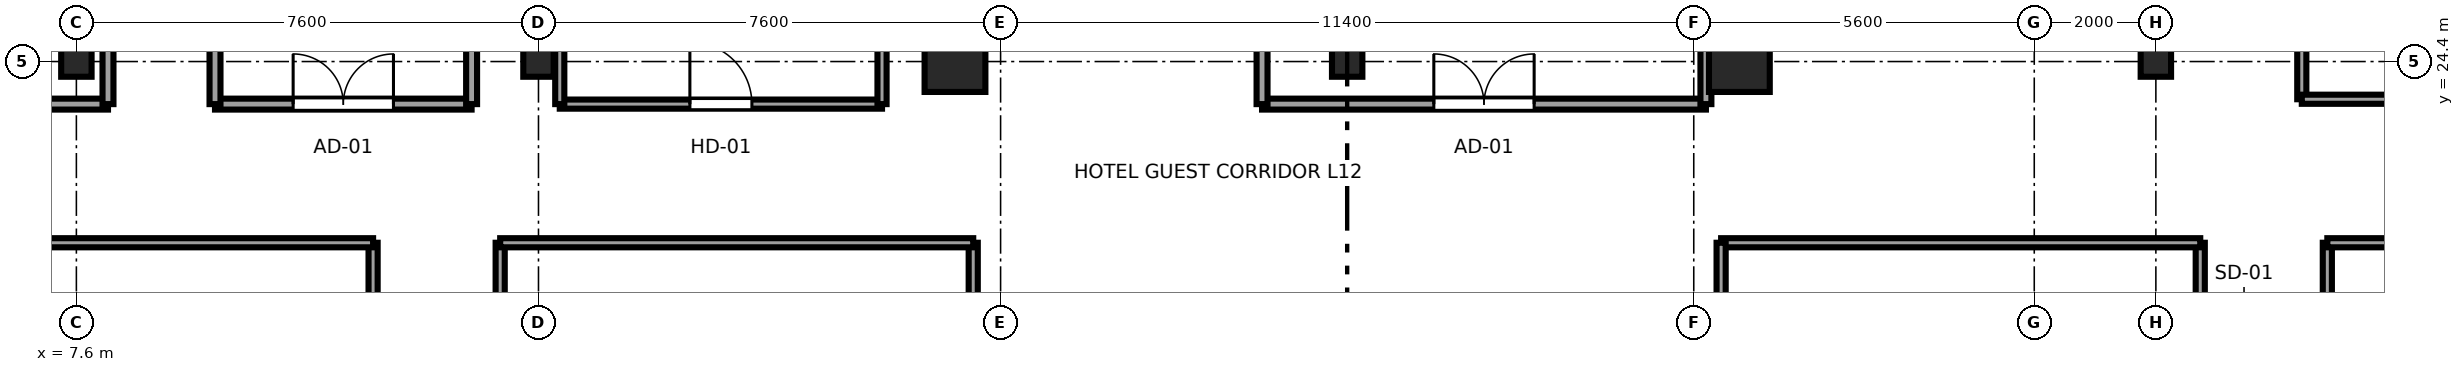
"""IFC4 building model, lengths in metres.
Left out: names, types, materials, properties, quantities, classifications, styles, units other than length and angle.
Written with IfcOpenShell. Run it as: python <this file> out.ifc"""

import sys

from ifc_helpers import new_model, si_unit, direction, frame, frame_2d, origin, origin_2d, place, context, subcontext, project, spatial, rectangle, i_section, extrude, source, transform, mapped, element, fill, save


model = new_model("IFC4")
c1 = context("Model", 3, precision=1e-05, world=origin(), true_north=direction((0.0, 1.0)))
c2 = subcontext(c1, "Body", "Model", "MODEL_VIEW")
j1 = project(units=[si_unit("LENGTHUNIT", "METRE"), si_unit("PLANEANGLEUNIT", "RADIAN")], contexts=[c1])
p1 = place(None, origin())
s1 = spatial("IfcSite", under=j1, at=p1, CompositionType="ELEMENT")
p2 = place(p1, origin())
s2 = spatial("IfcBuilding", under=s1, at=p2, CompositionType="ELEMENT")
p3 = place(p2, frame((0.0, 0.0, 53.3)))
s3 = spatial("IfcBuildingStorey", under=s2, at=p3, CompositionType="ELEMENT", Elevation=53.3)
m1 = source(origin(), c2, "Body", "SweptSolid", [
    extrude(i_section(OverallWidth=0.5, OverallDepth=0.5, WebThickness=0.028, FlangeThickness=0.045, at=origin_2d()), origin(), (0.0, 0.0, 1.0), 3.55),
])
for number, where, z_axis, x_axis in (
    (1, (7.6, 24.4, 0.0), (0.0, 0.0, 1.0), (1.0, 0.0, 0.0)),
    (2, (15.2, 24.4, 0.0), (0.0, 0.0, 1.0), (1.0, 0.0, 0.0)),
):
    element("IfcColumn", number, at=place(p3, frame(where, z_axis=z_axis, x_axis=x_axis)), inside=s3, PredefinedType="COLUMN", context=c2, shape_type="MappedRepresentation", body=[
        mapped(m1, transform((0.0, 0.0, 0.0), x_axis=(1.0, 0.0, 0.0), y_axis=(0.0, 1.0, 0.0), z_axis=(0.0, 0.0, 1.0), scale=1.0)),
    ])
m2 = source(origin(), c2, "Body", "SweptSolid", [
    extrude(rectangle(XDim=1.0, YDim=1.0, at=origin_2d()), origin(), (0.0, 0.0, 1.0), 3.55),
])
for number, where, z_axis, x_axis in (
    (3, (22.05, 24.4, 0.0), (0.0, 0.0, 1.0), (1.0, 0.0, 0.0)),
    (4, (34.95, 24.4, 0.0), (0.0, 0.0, 1.0), (1.0, 0.0, 0.0)),
):
    element("IfcColumn", number, at=place(p3, frame(where, z_axis=z_axis, x_axis=x_axis)), inside=s3, PredefinedType="COLUMN", context=c2, shape_type="MappedRepresentation", body=[
        mapped(m2, transform((0.0, 0.0, 0.0), x_axis=(1.0, 0.0, 0.0), y_axis=(0.0, 1.0, 0.0), z_axis=(0.0, 0.0, 1.0), scale=1.0)),
    ])
for number, where, z_axis, x_axis in (
    (5, (41.8, 24.4, 0.0), (0.0, 0.0, 1.0), (1.0, 0.0, 0.0)),
    (6, (28.5, 24.4, 0.0), (0.0, 0.0, 1.0), (1.0, 0.0, 0.0)),
):
    element("IfcColumn", number, at=place(p3, frame(where, z_axis=z_axis, x_axis=x_axis)), inside=s3, PredefinedType="COLUMN", context=c2, shape_type="MappedRepresentation", body=[
        mapped(m1, transform((0.0, 0.0, 0.0), x_axis=(1.0, 0.0, 0.0), y_axis=(0.0, 1.0, 0.0), z_axis=(0.0, 0.0, 1.0), scale=1.0)),
    ])
p4 = place(p3, frame((12.48, 17.01, 0.0), z_axis=(0.0, 0.0, 1.0), x_axis=(0.0, 1.0, 0.0)))
e7 = element("IfcWall", 7, at=p4, inside=s3, PredefinedType="PARTITIONING", context=c2, shape_type="SweptSolid", body=[
    extrude(rectangle(XDim=4.41, YDim=0.15, at=frame_2d((2.205, 0.0))), origin(), (0.0, 0.0, 1.0), 3.37),
])
p5 = place(p4, frame((1.695, 0.0, 0.0)))
e8 = element("IfcOpeningElement", 8, at=p5, cuts=e7, PredefinedType="OPENING", context=c2, shape_type="SweptSolid", body=[
    extrude(rectangle(XDim=0.98, YDim=2.12, at=frame_2d((0.49, 1.06))), frame((0.0, 0.085, 0.0), z_axis=(0.0, -1.0, 0.0), x_axis=(1.0, 0.0, 0.0)), (0.0, 0.0, 1.0), 0.17),
])
p6 = place(p3, frame((0.3, 21.42, 0.0), z_axis=(0.0, 0.0, 1.0), x_axis=(1.0, 0.0, 0.0)))
e9 = element("IfcWall", 9, at=p6, inside=s3, PredefinedType="PARTITIONING", context=c2, shape_type="SweptSolid", body=[
    extrude(rectangle(XDim=12.18, YDim=0.15, at=frame_2d((6.09, 0.0))), origin(), (0.0, 0.0, 1.0), 3.37),
])
p7 = place(p3, frame((14.57, 13.41, 0.0), z_axis=(0.0, 0.0, 1.0), x_axis=(0.0, 1.0, 0.0)))
e10 = element("IfcWall", 10, at=p7, inside=s3, PredefinedType="PARTITIONING", context=c2, shape_type="SweptSolid", body=[
    extrude(rectangle(XDim=8.01, YDim=0.15, at=frame_2d((4.005, 0.0))), origin(), (0.0, 0.0, 1.0), 3.37),
])
p8 = place(p7, frame((3.795, 0.0, 0.0)))
e11 = element("IfcOpeningElement", 11, at=p8, cuts=e10, PredefinedType="OPENING", context=c2, shape_type="SweptSolid", body=[
    extrude(rectangle(XDim=0.98, YDim=2.12, at=frame_2d((0.49, 1.06))), frame((0.0, 0.085, 0.0), z_axis=(0.0, -1.0, 0.0), x_axis=(1.0, 0.0, 0.0)), (0.0, 0.0, 1.0), 0.17),
])
p9 = place(p3, frame((22.35, 11.08, 0.0), z_axis=(0.0, 0.0, 1.0), x_axis=(0.0, 1.0, 0.0)))
e12 = element("IfcWall", 12, at=p9, inside=s3, PredefinedType="PARTITIONING", context=c2, shape_type="SweptSolid", body=[
    extrude(rectangle(XDim=10.34, YDim=0.15, at=frame_2d((5.17, 0.0))), origin(), (0.0, 0.0, 1.0), 3.37),
])
p10 = place(p3, frame((14.57, 21.42, 0.0), z_axis=(0.0, 0.0, 1.0), x_axis=(1.0, 0.0, 0.0)))
e13 = element("IfcWall", 13, at=p10, inside=s3, PredefinedType="PARTITIONING", context=c2, shape_type="SweptSolid", body=[
    extrude(rectangle(XDim=7.78, YDim=0.15, at=frame_2d((3.89, 0.0))), origin(), (0.0, 0.0, 1.0), 3.37),
])
p11 = place(p3, frame((42.53, 18.437, 0.0), z_axis=(0.0, 0.0, 1.0), x_axis=(0.0, 1.0, 0.0)))
e14 = element("IfcWall", 14, at=p11, inside=s3, PredefinedType="PARTITIONING", context=c2, shape_type="SweptSolid", body=[
    extrude(rectangle(XDim=2.983, YDim=0.15, at=frame_2d((1.491, 0.0))), origin(), (0.0, 0.0, 1.0), 3.37),
])
p12 = place(p11, frame((0.981, 0.0, 0.0)))
e15 = element("IfcOpeningElement", 15, at=p12, cuts=e14, PredefinedType="OPENING", context=c2, shape_type="SweptSolid", body=[
    extrude(rectangle(XDim=0.98, YDim=2.12, at=frame_2d((0.49, 1.06))), frame((0.0, 0.085, 0.0), z_axis=(0.0, -1.0, 0.0), x_axis=(1.0, 0.0, 0.0)), (0.0, 0.0, 1.0), 0.17),
])
p13 = place(p3, frame((34.65, 21.42, 0.0), z_axis=(0.0, 0.0, 1.0), x_axis=(1.0, 0.0, 0.0)))
e16 = element("IfcWall", 16, at=p13, inside=s3, PredefinedType="PARTITIONING", context=c2, shape_type="SweptSolid", body=[
    extrude(rectangle(XDim=7.88, YDim=0.15, at=frame_2d((3.94, 0.0))), origin(), (0.0, 0.0, 1.0), 3.37),
])
p14 = place(p3, frame((34.65, 16.48, 0.0), z_axis=(0.0, 0.0, 1.0), x_axis=(0.0, 1.0, 0.0)))
e17 = element("IfcWall", 17, at=p14, inside=s3, PredefinedType="PARTITIONING", context=c2, shape_type="SweptSolid", body=[
    extrude(rectangle(XDim=4.94, YDim=0.15, at=frame_2d((2.47, 0.0))), origin(), (0.0, 0.0, 1.0), 3.37),
])
p15 = place(p3, frame((44.62, 18.313, 0.0), z_axis=(0.0, 0.0, 1.0), x_axis=(0.0, 1.0, 0.0)))
e18 = element("IfcWall", 18, at=p15, inside=s3, PredefinedType="PARTITIONING", context=c2, shape_type="SweptSolid", body=[
    extrude(rectangle(XDim=3.107, YDim=0.15, at=frame_2d((1.553, 0.0))), origin(), (0.0, 0.0, 1.0), 3.37),
])
p16 = place(p15, frame((1.043, 0.0, 0.0)))
e19 = element("IfcOpeningElement", 19, at=p16, cuts=e18, PredefinedType="OPENING", context=c2, shape_type="SweptSolid", body=[
    extrude(rectangle(XDim=0.98, YDim=2.12, at=frame_2d((0.49, 1.06))), frame((0.0, 0.085, 0.0), z_axis=(0.0, -1.0, 0.0), x_axis=(1.0, 0.0, 0.0)), (0.0, 0.0, 1.0), 0.17),
])
p17 = place(p3, frame((44.62, 21.42, 0.0), z_axis=(0.0, 0.0, 1.0), x_axis=(1.0, 0.0, 0.0)))
e20 = element("IfcWall", 20, at=p17, inside=s3, PredefinedType="PARTITIONING", context=c2, shape_type="SweptSolid", body=[
    extrude(rectangle(XDim=11.975, YDim=0.15, at=frame_2d((5.987, 0.0))), origin(), (0.0, 0.0, 1.0), 3.37),
])
p18 = place(p3, frame((0.3, 23.7, 0.0), z_axis=(0.0, 0.0, 1.0), x_axis=(1.0, 0.0, 0.0)))
e21 = element("IfcWall", 21, at=p18, inside=s3, PredefinedType="PARTITIONING", context=c2, shape_type="SweptSolid", body=[
    extrude(rectangle(XDim=7.82, YDim=0.18, at=frame_2d((3.91, 0.0))), origin(), (0.0, 0.0, 1.0), 3.37),
])
p19 = place(p18, frame((3.085, 0.0, 0.0)))
e22 = element("IfcOpeningElement", 22, at=p19, cuts=e21, PredefinedType="OPENING", context=c2, shape_type="SweptSolid", body=[
    extrude(rectangle(XDim=1.65, YDim=2.15, at=frame_2d((0.825, 1.075))), frame((0.0, 0.1, 0.0), z_axis=(0.0, -1.0, 0.0), x_axis=(1.0, 0.0, 0.0)), (0.0, 0.0, 1.0), 0.2),
])
p20 = place(p3, frame((8.12, 23.7, 0.0), z_axis=(0.0, 0.0, 1.0), x_axis=(0.0, 1.0, 0.0)))
e23 = element("IfcWall", 23, at=p20, inside=s3, PredefinedType="PARTITIONING", context=c2, shape_type="SweptSolid", body=[
    extrude(rectangle(XDim=3.6, YDim=0.18, at=frame_2d((1.8, 0.0))), origin(), (0.0, 0.0, 1.0), 3.37),
])
p21 = place(p3, frame((44.2, 23.78, 0.0), z_axis=(0.0, 0.0, 1.0), x_axis=(0.0, 1.0, 0.0)))
e24 = element("IfcWall", 24, at=p21, inside=s3, PredefinedType="PARTITIONING", context=c2, shape_type="SweptSolid", body=[
    extrude(rectangle(XDim=5.69, YDim=0.15, at=frame_2d((2.845, 0.0))), origin(), (0.0, 0.0, 1.0), 3.37),
])
p22 = place(p21, frame((2.355, 0.0, 0.0)))
e25 = element("IfcOpeningElement", 25, at=p22, cuts=e24, PredefinedType="OPENING", context=c2, shape_type="SweptSolid", body=[
    extrude(rectangle(XDim=0.98, YDim=2.12, at=frame_2d((0.49, 1.06))), frame((0.0, 0.085, 0.0), z_axis=(0.0, -1.0, 0.0), x_axis=(1.0, 0.0, 0.0)), (0.0, 0.0, 1.0), 0.17),
])
p23 = place(p3, frame((44.2, 23.78, 0.0), z_axis=(0.0, 0.0, 1.0), x_axis=(1.0, 0.0, 0.0)))
e26 = element("IfcWall", 26, at=p23, inside=s3, PredefinedType="PARTITIONING", context=c2, shape_type="SweptSolid", body=[
    extrude(rectangle(XDim=12.395, YDim=0.15, at=frame_2d((6.198, 0.0))), origin(), (0.0, 0.0, 1.0), 3.37),
])
p24 = place(p3, frame((9.88, 23.7, 0.0), z_axis=(0.0, 0.0, 1.0), x_axis=(1.0, 0.0, 0.0)))
e27 = element("IfcWall", 27, at=p24, inside=s3, PredefinedType="PARTITIONING", context=c2, shape_type="SweptSolid", body=[
    extrude(rectangle(XDim=4.22, YDim=0.18, at=frame_2d((2.11, 0.0))), origin(), (0.0, 0.0, 1.0), 3.37),
])
p25 = place(p24, frame((1.285, 0.0, 0.0)))
e28 = element("IfcOpeningElement", 28, at=p25, cuts=e27, PredefinedType="OPENING", context=c2, shape_type="SweptSolid", body=[
    extrude(rectangle(XDim=1.65, YDim=2.15, at=frame_2d((0.825, 1.075))), frame((0.0, 0.1, 0.0), z_axis=(0.0, -1.0, 0.0), x_axis=(1.0, 0.0, 0.0)), (0.0, 0.0, 1.0), 0.2),
])
for number, where, z_axis, x_axis in (
    (29, (9.88, 23.7, 0.0), (0.0, 0.0, 1.0), (0.0, 1.0, 0.0)),
    (30, (14.1, 23.7, 0.0), (0.0, 0.0, 1.0), (0.0, 1.0, 0.0)),
):
    element("IfcWall", number, at=place(p3, frame(where, z_axis=z_axis, x_axis=x_axis)), inside=s3, PredefinedType="PARTITIONING", context=c2, shape_type="SweptSolid", body=[
        extrude(rectangle(XDim=6.05, YDim=0.18, at=frame_2d((3.025, 0.0))), origin(), (0.0, 0.0, 1.0), 3.37),
    ])
p26 = place(p3, frame((27.1, 23.7, 0.0), z_axis=(0.0, 0.0, 1.0), x_axis=(1.0, 0.0, 0.0)))
e31 = element("IfcWall", 31, at=p26, inside=s3, PredefinedType="PARTITIONING", context=c2, shape_type="SweptSolid", body=[
    extrude(rectangle(XDim=7.3, YDim=0.18, at=frame_2d((3.65, 0.0))), origin(), (0.0, 0.0, 1.0), 3.37),
])
p27 = place(p26, frame((2.825, 0.0, 0.0)))
e32 = element("IfcOpeningElement", 32, at=p27, cuts=e31, PredefinedType="OPENING", context=c2, shape_type="SweptSolid", body=[
    extrude(rectangle(XDim=1.65, YDim=2.15, at=frame_2d((0.825, 1.075))), frame((0.0, 0.1, 0.0), z_axis=(0.0, -1.0, 0.0), x_axis=(1.0, 0.0, 0.0)), (0.0, 0.0, 1.0), 0.2),
])
for number, where, z_axis, x_axis in (
    (33, (27.1, 23.7, 0.0), (0.0, 0.0, 1.0), (0.0, 1.0, 0.0)),
    (34, (34.4, 23.7, 0.0), (0.0, 0.0, 1.0), (0.0, 1.0, 0.0)),
):
    element("IfcWall", number, at=place(p3, frame(where, z_axis=z_axis, x_axis=x_axis)), inside=s3, PredefinedType="PARTITIONING", context=c2, shape_type="SweptSolid", body=[
        extrude(rectangle(XDim=6.1, YDim=0.18, at=frame_2d((3.05, 0.0))), origin(), (0.0, 0.0, 1.0), 3.37),
    ])
p28 = place(p3, frame((15.55, 23.7, 0.0), z_axis=(0.0, 0.0, 1.0), x_axis=(1.0, 0.0, 0.0)))
e35 = element("IfcWall", 35, at=p28, inside=s3, PredefinedType="PARTITIONING", context=c2, shape_type="SweptSolid", body=[
    extrude(rectangle(XDim=5.3, YDim=0.15, at=frame_2d((2.65, 0.0))), origin(), (0.0, 0.0, 1.0), 3.37),
])
p29 = place(p28, frame((2.14, 0.0, 0.0)))
e36 = element("IfcOpeningElement", 36, at=p29, cuts=e35, PredefinedType="OPENING", context=c2, shape_type="SweptSolid", body=[
    extrude(rectangle(XDim=1.02, YDim=2.03, at=frame_2d((0.51, 1.015))), frame((0.0, 0.085, 0.0), z_axis=(0.0, -1.0, 0.0), x_axis=(1.0, 0.0, 0.0)), (0.0, 0.0, 1.0), 0.17),
])
for number, where, z_axis, x_axis in (
    (37, (15.55, 23.7, 0.0), (0.0, 0.0, 1.0), (0.0, 1.0, 0.0)),
    (38, (20.85, 23.7, 0.0), (0.0, 0.0, 1.0), (0.0, 1.0, 0.0)),
):
    element("IfcWall", number, at=place(p3, frame(where, z_axis=z_axis, x_axis=x_axis)), inside=s3, PredefinedType="PARTITIONING", context=c2, shape_type="SweptSolid", body=[
        extrude(rectangle(XDim=6.1, YDim=0.15, at=frame_2d((3.05, 0.0))), origin(), (0.0, 0.0, 1.0), 3.37),
    ])
m3 = source(origin(), c2, "Body", "SweptSolid", [
    extrude(rectangle(XDim=1.65, YDim=2.15, at=frame_2d((0.825, 1.075))), frame((0.0, 0.025, 0.0), z_axis=(0.0, -1.0, 0.0), x_axis=(1.0, 0.0, 0.0)), (0.0, 0.0, 1.0), 0.05),
])
p30 = place(p25, origin())
e39 = element("IfcDoor", 39, at=p30, inside=s3, OperationType="DOUBLE_DOOR_SINGLE_SWING", PredefinedType="DOOR", context=c2, shape_type="MappedRepresentation", body=[
    mapped(m3, transform((0.0, 0.0, 0.0), x_axis=(1.0, 0.0, 0.0), y_axis=(0.0, 1.0, 0.0), z_axis=(0.0, 0.0, 1.0), scale=1.0)),
])
fill(e28, e39)
p31 = place(p27, origin())
e40 = element("IfcDoor", 40, at=p31, inside=s3, OperationType="DOUBLE_DOOR_SINGLE_SWING", PredefinedType="DOOR", context=c2, shape_type="MappedRepresentation", body=[
    mapped(m3, transform((0.0, 0.0, 0.0), x_axis=(1.0, 0.0, 0.0), y_axis=(0.0, 1.0, 0.0), z_axis=(0.0, 0.0, 1.0), scale=1.0)),
])
fill(e32, e40)
m4 = source(origin(), c2, "Body", "SweptSolid", [
    extrude(rectangle(XDim=1.02, YDim=2.03, at=frame_2d((0.51, 1.015))), frame((0.0, 0.025, 0.0), z_axis=(0.0, -1.0, 0.0), x_axis=(1.0, 0.0, 0.0)), (0.0, 0.0, 1.0), 0.05),
])
p32 = place(p29, origin())
e41 = element("IfcDoor", 41, at=p32, inside=s3, OperationType="SINGLE_SWING_LEFT", PredefinedType="DOOR", context=c2, shape_type="MappedRepresentation", body=[
    mapped(m4, transform((0.0, 0.0, 0.0), x_axis=(1.0, 0.0, 0.0), y_axis=(0.0, 1.0, 0.0), z_axis=(0.0, 0.0, 1.0), scale=1.0)),
])
fill(e36, e41)
save(model, sys.argv[1])
